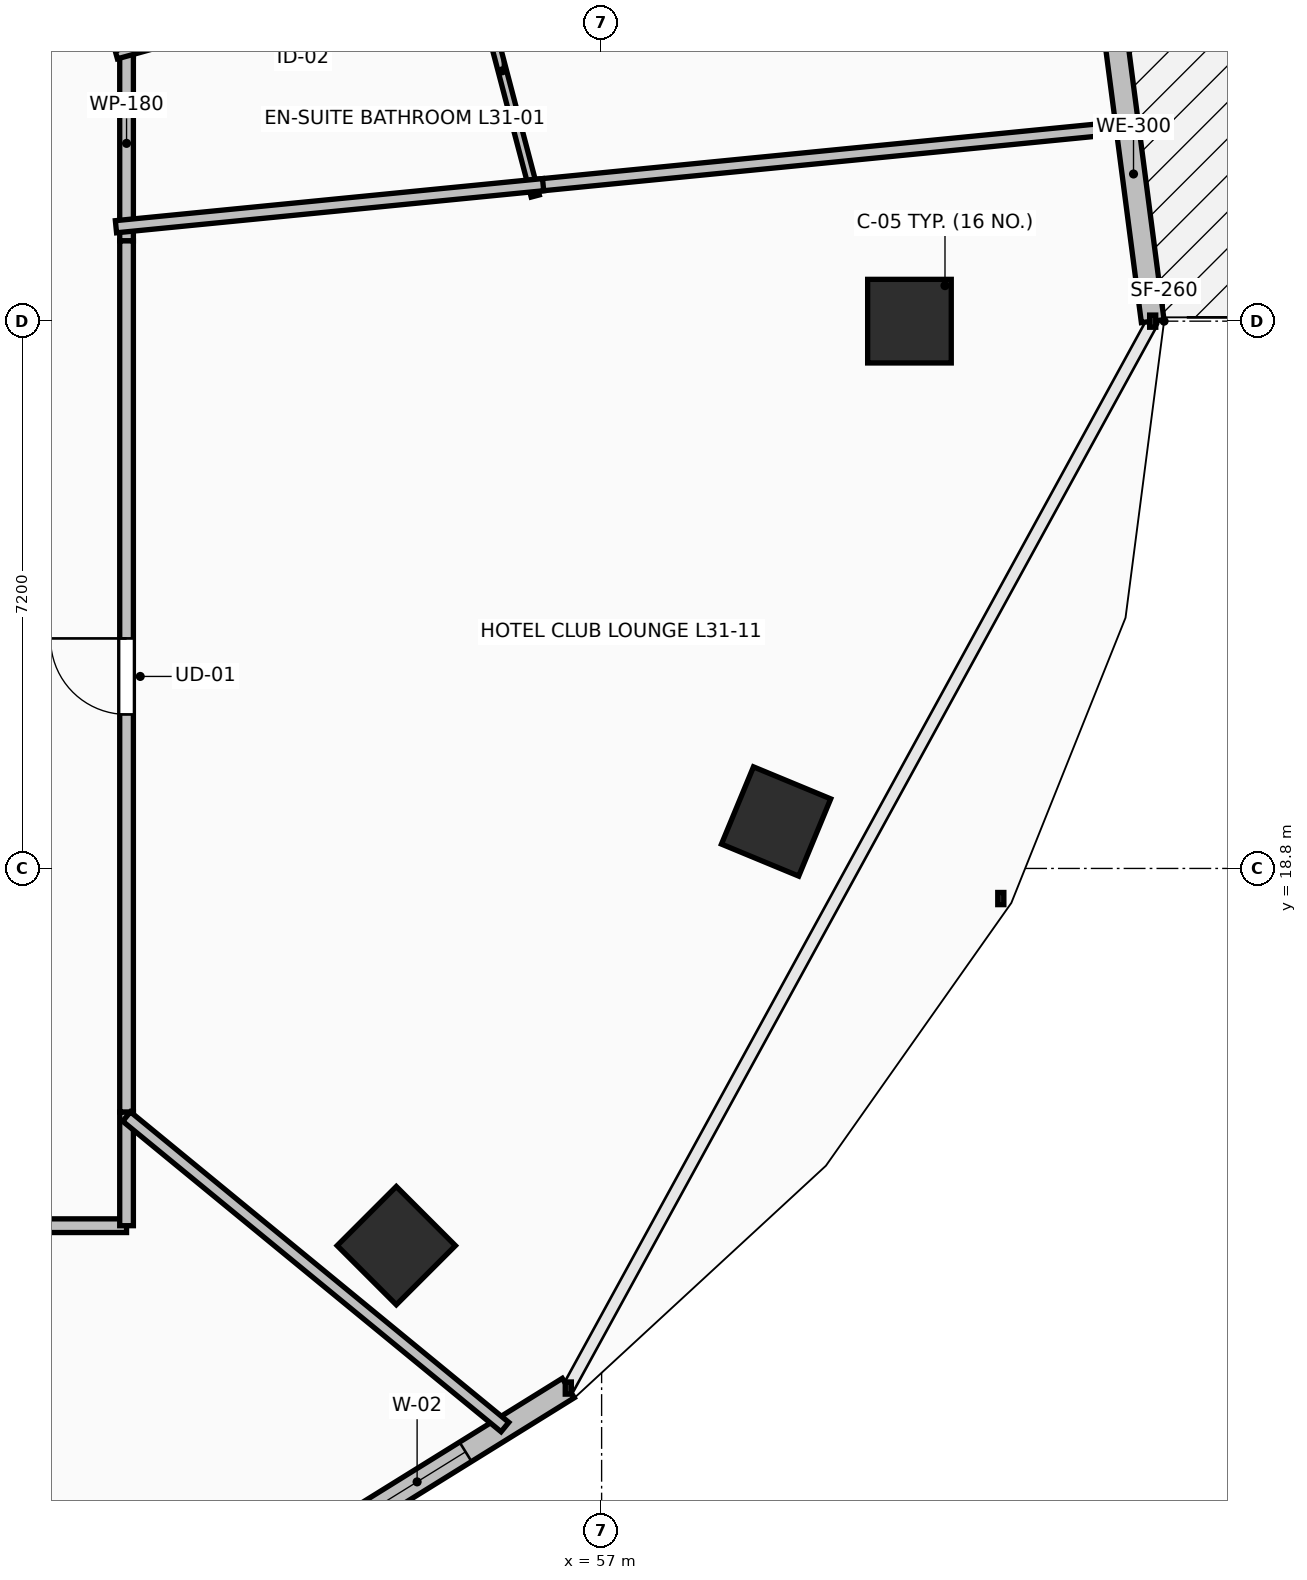
"""IFC4 building model, lengths in metres.
Left out: names, types, materials, properties, quantities, classifications, styles, units other than length and angle.
Written with IfcOpenShell. Run it as: python <this file> out.ifc"""

import sys

from ifc_helpers import new_model, si_unit, direction, frame, frame_2d, origin, origin_2d, place, context, subcontext, project, spatial, rectangle, extrude, element, fill, save


model = new_model("IFC4")
c1 = context("Model", 3, precision=1e-05, world=origin(), true_north=direction((0.0, 1.0)))
c2 = subcontext(c1, "Body", "Model", "MODEL_VIEW")
j1 = project(units=[si_unit("LENGTHUNIT", "METRE"), si_unit("PLANEANGLEUNIT", "RADIAN")], contexts=[c1])
p1 = place(None, origin())
s1 = spatial("IfcSite", under=j1, at=p1, CompositionType="ELEMENT")
p2 = place(p1, origin())
s2 = spatial("IfcBuilding", under=s1, at=p2, CompositionType="ELEMENT")
p3 = place(p2, frame((0.0, 0.0, 117.3)))
s3 = spatial("IfcBuildingStorey", under=s2, at=p3, CompositionType="ELEMENT", Elevation=117.3)
for number, where, z_axis, x_axis in (
    (1, (61.05, 26.0, 0.0), (0.0, 0.0, 1.0), (1.0, 0.0, 0.0)),
    (2, (54.299, 13.838, 0.0), (0.0, 0.0, 1.0), (0.707, -0.707, 0.0)),
    (3, (59.295, 19.418, 0.0), (0.0, 0.0, 1.0), (0.924, -0.383, 0.0)),
):
    element("IfcColumn", number, at=place(p3, frame(where, z_axis=z_axis, x_axis=x_axis)), inside=s3, PredefinedType="COLUMN", context=c2, shape_type="SweptSolid", body=[
        extrude(rectangle(XDim=1.1, YDim=1.1, at=origin_2d()), origin(), (0.0, 0.0, 1.0), 3.5),
    ])
p4 = place(p3, frame((64.25, 26.0, 0.0), z_axis=(0.0, 0.0, 1.0), x_axis=(-0.129157444793, 0.991624099372, 0.0)))
e4 = element("IfcWall", 4, at=p4, inside=s3, PredefinedType="STANDARD", context=c2, shape_type="SweptSolid", body=[
    extrude(rectangle(XDim=3.905, YDim=0.3, at=frame_2d((1.953, 0.0))), origin(), (0.0, 0.0, 1.0), 3.24),
])
p5 = place(p3, frame((52.584, 9.495, 0.0), z_axis=(0.0, 0.0, 1.0), x_axis=(0.849684479743, 0.527291461038, 0.0)))
e5 = element("IfcWall", 5, at=p5, inside=s3, PredefinedType="STANDARD", context=c2, shape_type="SweptSolid", body=[
    extrude(rectangle(XDim=4.681, YDim=0.3, at=frame_2d((2.341, 0.0))), origin(), (0.0, 0.0, 1.0), 3.24),
])
p6 = place(p5, frame((1.591, 0.0, 0.85)))
e6 = element("IfcOpeningElement", 6, at=p6, cuts=e5, PredefinedType="OPENING", context=c2, shape_type="SweptSolid", body=[
    extrude(rectangle(XDim=1.5, YDim=2.19, at=frame_2d((0.75, 1.095))), frame((0.0, 0.165, 0.0), z_axis=(0.0, -1.0, 0.0), x_axis=(1.0, 0.0, 0.0)), (0.0, 0.0, 1.0), 0.33),
])
p7 = place(p3, frame((50.75, 29.482, 0.0), z_axis=(0.0, 0.0, 1.0), x_axis=(0.0, 1.0, 0.0)))
e7 = element("IfcWall", 7, at=p7, inside=s3, PredefinedType="PARTITIONING", context=c2, shape_type="SweptSolid", body=[
    extrude(rectangle(XDim=3.401, YDim=0.18, at=frame_2d((1.701, 0.0))), origin(), (0.0, 0.0, 1.0), 2.432),
])
p8 = place(p7, frame((1.176, 0.0, 0.0)))
e8 = element("IfcOpeningElement", 8, at=p8, cuts=e7, PredefinedType="OPENING", context=c2, shape_type="SweptSolid", body=[
    extrude(rectangle(XDim=1.05, YDim=2.2, at=frame_2d((0.525, 1.1))), frame((0.0, 0.105, 0.0), z_axis=(0.0, -1.0, 0.0), x_axis=(1.0, 0.0, 0.0)), (0.0, 0.0, 1.0), 0.21),
])
p9 = place(p3, frame((50.75, 27.056, 0.0), z_axis=(0.0, 0.0, 1.0), x_axis=(0.0, 1.0, 0.0)))
e9 = element("IfcWall", 9, at=p9, inside=s3, PredefinedType="PARTITIONING", context=c2, shape_type="SweptSolid", body=[
    extrude(rectangle(XDim=2.566, YDim=0.18, at=frame_2d((1.283, 0.0))), origin(), (0.0, 0.0, 1.0), 2.432),
])
p10 = place(p3, frame((42.34, 14.1, 0.0), z_axis=(0.0, 0.0, 1.0), x_axis=(1.0, 0.0, 0.0)))
e10 = element("IfcWall", 10, at=p10, inside=s3, PredefinedType="PARTITIONING", context=c2, shape_type="SweptSolid", body=[
    extrude(rectangle(XDim=8.41, YDim=0.18, at=frame_2d((4.205, 0.0))), origin(), (0.0, 0.0, 1.0), 2.432),
])
p11 = place(p10, frame((3.705, 0.0, 0.0)))
e11 = element("IfcOpeningElement", 11, at=p11, cuts=e10, PredefinedType="OPENING", context=c2, shape_type="SweptSolid", body=[
    extrude(rectangle(XDim=1.0, YDim=2.15, at=frame_2d((0.5, 1.075))), frame((0.0, 0.105, 0.0), z_axis=(0.0, -1.0, 0.0), x_axis=(1.0, 0.0, 0.0)), (0.0, 0.0, 1.0), 0.21),
])
p12 = place(p3, frame((50.75, 14.1, 0.0), z_axis=(0.0, 0.0, 1.0), x_axis=(0.0, 1.0, 0.0)))
e12 = element("IfcWall", 12, at=p12, inside=s3, PredefinedType="PARTITIONING", context=c2, shape_type="SweptSolid", body=[
    extrude(rectangle(XDim=1.496, YDim=0.18, at=frame_2d((0.748, 0.0))), origin(), (0.0, 0.0, 1.0), 2.432),
])
p13 = place(p3, frame((50.75, 15.596, 0.0), z_axis=(0.0, 0.0, 1.0), x_axis=(0.0, 1.0, 0.0)))
e13 = element("IfcWall", 13, at=p13, inside=s3, PredefinedType="PARTITIONING", context=c2, shape_type="SweptSolid", body=[
    extrude(rectangle(XDim=11.46, YDim=0.18, at=frame_2d((5.73, 0.0))), origin(), (0.0, 0.0, 1.0), 2.432),
])
p14 = place(p13, frame((5.23, 0.0, 0.0)))
e14 = element("IfcOpeningElement", 14, at=p14, cuts=e13, PredefinedType="OPENING", context=c2, shape_type="SweptSolid", body=[
    extrude(rectangle(XDim=1.0, YDim=2.15, at=frame_2d((0.5, 1.075))), frame((0.0, 0.105, 0.0), z_axis=(0.0, -1.0, 0.0), x_axis=(1.0, 0.0, 0.0)), (0.0, 0.0, 1.0), 0.21),
])
p15 = place(p3, frame((55.26, 30.94, 0.0), z_axis=(0.0, 0.0, 1.0), x_axis=(0.254323935255, -0.967119090886, 0.0)))
e15 = element("IfcWall", 15, at=p15, inside=s3, PredefinedType="PARTITIONING", context=c2, shape_type="SweptSolid", body=[
    extrude(rectangle(XDim=3.406, YDim=0.11, at=frame_2d((1.703, 0.0))), origin(), (0.0, 0.0, 1.0), 2.929),
])
p16 = place(p3, frame((50.615, 29.504, 0.0), z_axis=(0.0, 0.0, 1.0), x_axis=(0.963498313434, 0.267714400078, 0.0)))
e16 = element("IfcWall", 16, at=p16, inside=s3, PredefinedType="PARTITIONING", context=c2, shape_type="SweptSolid", body=[
    extrude(rectangle(XDim=4.998, YDim=0.11, at=frame_2d((2.499, 0.0))), origin(), (0.0, 0.0, 1.0), 2.874),
])
p17 = place(p16, frame((2.074, 0.0, 0.0)))
e17 = element("IfcOpeningElement", 17, at=p17, cuts=e16, PredefinedType="OPENING", context=c2, shape_type="SweptSolid", body=[
    extrude(rectangle(XDim=0.85, YDim=2.1, at=frame_2d((0.425, 1.05))), frame((0.0, 0.07, 0.0), z_axis=(0.0, -1.0, 0.0), x_axis=(1.0, 0.0, 0.0)), (0.0, 0.0, 1.0), 0.14),
])
p18 = place(p3, frame((56.091, 27.782, 0.0), z_axis=(0.0, 0.0, 1.0), x_axis=(0.995182127762, 0.098043523927, 0.0)))
e18 = element("IfcWall", 18, at=p18, inside=s3, PredefinedType="PARTITIONING", context=c2, shape_type="SweptSolid", body=[
    extrude(rectangle(XDim=7.864, YDim=0.16, at=frame_2d((3.932, 0.0))), origin(), (0.0, 0.0, 1.0), 2.677),
])
p19 = place(p3, frame((50.611, 27.242, 0.0), z_axis=(0.0, 0.0, 1.0), x_axis=(0.995185043486, 0.098013923607, 0.0)))
e19 = element("IfcWall", 19, at=p19, inside=s3, PredefinedType="PARTITIONING", context=c2, shape_type="SweptSolid", body=[
    extrude(rectangle(XDim=5.647, YDim=0.16, at=frame_2d((2.823, 0.0))), origin(), (0.0, 0.0, 1.0), 2.432),
])
p20 = place(p3, frame((55.728, 11.451, 0.0), z_axis=(0.0, 0.0, 1.0), x_axis=(-0.7730409537, 0.634356117573, 0.0)))
e20 = element("IfcWall", 20, at=p20, inside=s3, PredefinedType="PARTITIONING", context=c2, shape_type="SweptSolid", body=[
    extrude(rectangle(XDim=6.439, YDim=0.16, at=frame_2d((3.22, 0.0))), origin(), (0.0, 0.0, 1.0), 2.432),
])
p21 = place(p6, origin())
e21 = element("IfcWindow", 21, at=p21, inside=s3, PartitioningType="SINGLE_PANEL", PredefinedType="WINDOW", context=c2, shape_type="SweptSolid", body=[
    extrude(rectangle(XDim=1.5, YDim=2.19, at=frame_2d((0.75, 1.095))), frame((0.0, 0.03, 0.0), z_axis=(0.0, -1.0, 0.0), x_axis=(1.0, 0.0, 0.0)), (0.0, 0.0, 1.0), 0.06),
])
fill(e6, e21)
p22 = place(p14, origin())
e22 = element("IfcDoor", 22, at=p22, inside=s3, OperationType="SINGLE_SWING_RIGHT", PredefinedType="DOOR", context=c2, shape_type="SweptSolid", body=[
    extrude(rectangle(XDim=1.0, YDim=2.15, at=frame_2d((0.5, 1.075))), frame((0.0, 0.025, 0.0), z_axis=(0.0, -1.0, 0.0), x_axis=(1.0, 0.0, 0.0)), (0.0, 0.0, 1.0), 0.05),
])
fill(e14, e22)
save(model, sys.argv[1])
